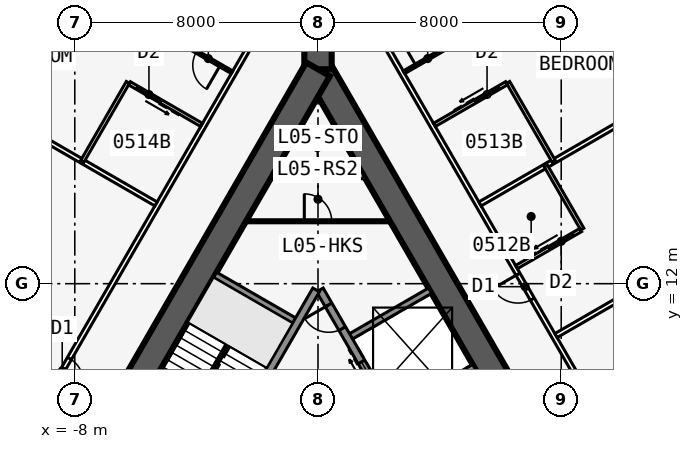
"""IFC4 building model, lengths in metres.
Left out: names, types, materials, properties, quantities, classifications, styles, units other than length and angle.
Written with IfcOpenShell. Run it as: python <this file> out.ifc"""

import sys

from ifc_helpers import new_model, si_unit, direction, frame, frame_2d, origin, place, context, subcontext, project, spatial, rectangle, extrude, element, fill, save


model = new_model("IFC4")
c1 = context("Model", 3, precision=1e-05, world=origin(), true_north=direction((0.0, 1.0)))
c2 = subcontext(c1, "Body", "Model", "MODEL_VIEW")
j1 = project(units=[si_unit("LENGTHUNIT", "METRE"), si_unit("PLANEANGLEUNIT", "RADIAN")], contexts=[c1])
p1 = place(None, origin())
s1 = spatial("IfcSite", under=j1, at=p1, CompositionType="ELEMENT")
p2 = place(p1, origin())
s2 = spatial("IfcBuilding", under=s1, at=p2, CompositionType="ELEMENT")
p3 = place(p2, frame((0.0, 0.0, 28.5)))
s3 = spatial("IfcBuildingStorey", under=s2, at=p3, CompositionType="ELEMENT", Elevation=28.5)
p4 = place(p3, frame((16.5, -9.526, 0.0), z_axis=(0.0, 0.0, 1.0), x_axis=(-0.499999749417, 0.866025548458, 0.0)))
e1 = element("IfcWall", 1, at=p4, inside=s3, PredefinedType="SHEAR", context=c2, shape_type="SweptSolid", body=[
    extrude(rectangle(XDim=33.0, YDim=0.9, at=frame_2d((16.5, 0.0))), origin(), (0.0, 0.0, 1.0), 3.4),
])
p5 = place(p4, frame((14.15, 0.0, 0.0)))
e2 = element("IfcOpeningElement", 2, at=p5, cuts=e1, PredefinedType="OPENING", context=c2, shape_type="SweptSolid", body=[
    extrude(rectangle(XDim=1.8, YDim=2.13, at=frame_2d((0.9, 1.065))), frame((0.0, 0.46, 0.0), z_axis=(0.0, -1.0, 0.0), x_axis=(1.0, 0.0, 0.0)), (0.0, 0.0, 1.0), 0.92),
])
p6 = place(p4, frame((12.6, 0.0, 0.0)))
e3 = element("IfcOpeningElement", 3, at=p6, cuts=e1, PredefinedType="OPENING", context=c2, shape_type="SweptSolid", body=[
    extrude(rectangle(XDim=1.0, YDim=2.13, at=frame_2d((0.5, 1.065))), frame((0.0, 0.46, 0.0), z_axis=(0.0, -1.0, 0.0), x_axis=(1.0, 0.0, 0.0)), (0.0, 0.0, 1.0), 0.92),
])
p7 = place(p3, frame((5.379, 2.586, 0.0), z_axis=(0.0, 0.0, 1.0), x_axis=(-0.500001375892, 0.866024609411, 0.0)))
e4 = element("IfcWall", 4, at=p7, inside=s3, PredefinedType="SOLIDWALL", context=c2, shape_type="SweptSolid", body=[
    extrude(rectangle(XDim=10.633, YDim=0.25, at=frame_2d((5.316, 0.0))), origin(), (0.0, 0.0, 1.0), 3.235),
])
p8 = place(p7, frame((9.164, 0.0, 0.0)))
e5 = element("IfcOpeningElement", 5, at=p8, cuts=e4, PredefinedType="OPENING", context=c2, shape_type="SweptSolid", body=[
    extrude(rectangle(XDim=0.9, YDim=2.13, at=frame_2d((0.45, 1.065))), frame((0.0, 0.135, 0.0), z_axis=(0.0, -1.0, 0.0), x_axis=(1.0, 0.0, 0.0)), (0.0, 0.0, 1.0), 0.27),
])
p9 = place(p7, frame((1.0, 0.0, 0.0)))
e6 = element("IfcOpeningElement", 6, at=p9, cuts=e4, PredefinedType="OPENING", context=c2, shape_type="SweptSolid", body=[
    extrude(rectangle(XDim=1.1, YDim=2.13, at=frame_2d((0.55, 1.065))), frame((0.0, 0.135, 0.0), z_axis=(0.0, -1.0, 0.0), x_axis=(1.0, 0.0, 0.0)), (0.0, 0.0, 1.0), 0.27),
])
p10 = place(p7, frame((3.9, 0.0, 0.0)))
e7 = element("IfcOpeningElement", 7, at=p10, cuts=e4, PredefinedType="OPENING", context=c2, shape_type="SweptSolid", body=[
    extrude(rectangle(XDim=1.1, YDim=2.13, at=frame_2d((0.55, 1.065))), frame((0.0, 0.135, 0.0), z_axis=(0.0, -1.0, 0.0), x_axis=(1.0, 0.0, 0.0)), (0.0, 0.0, 1.0), 0.27),
])
p11 = place(p7, frame((6.8, 0.0, 0.0)))
e8 = element("IfcOpeningElement", 8, at=p11, cuts=e4, PredefinedType="OPENING", context=c2, shape_type="SweptSolid", body=[
    extrude(rectangle(XDim=1.1, YDim=2.13, at=frame_2d((0.55, 1.065))), frame((0.0, 0.135, 0.0), z_axis=(0.0, -1.0, 0.0), x_axis=(1.0, 0.0, 0.0)), (0.0, 0.0, 1.0), 0.27),
])
for number, where, z_axis, x_axis in (
    (9, (2.429, 7.696, 0.0), (0.0, 0.0, 1.0), (0.866, 0.5, 0.0)),
    (10, (0.979, 10.207, 0.0), (0.0, 0.0, 1.0), (0.866, 0.5, 0.0)),
):
    element("IfcWall", number, at=place(p3, frame(where, z_axis=z_axis, x_axis=x_axis)), inside=s3, PredefinedType="SOLIDWALL", context=c2, shape_type="SweptSolid", body=[
        extrude(rectangle(XDim=3.125, YDim=0.2, at=frame_2d((1.562, 0.0))), origin(), (0.0, 0.0, 1.0), 3.235),
    ])
p12 = place(p3, frame((0.0, 19.052, 0.0), z_axis=(0.0, 0.0, 1.0), x_axis=(-0.499999749417, -0.866025548458, 0.0)))
e11 = element("IfcWall", 11, at=p12, inside=s3, PredefinedType="SHEAR", context=c2, shape_type="SweptSolid", body=[
    extrude(rectangle(XDim=33.0, YDim=0.9, at=frame_2d((16.5, 0.0))), origin(), (0.0, 0.0, 1.0), 3.4),
])
p13 = place(p12, frame((14.15, 0.0, 0.0)))
e12 = element("IfcOpeningElement", 12, at=p13, cuts=e11, PredefinedType="OPENING", context=c2, shape_type="SweptSolid", body=[
    extrude(rectangle(XDim=1.8, YDim=2.13, at=frame_2d((0.9, 1.065))), frame((0.0, 0.46, 0.0), z_axis=(0.0, -1.0, 0.0), x_axis=(1.0, 0.0, 0.0)), (0.0, 0.0, 1.0), 0.92),
])
p14 = place(p12, frame((12.6, 0.0, 0.0)))
e13 = element("IfcOpeningElement", 13, at=p14, cuts=e11, PredefinedType="OPENING", context=c2, shape_type="SweptSolid", body=[
    extrude(rectangle(XDim=1.0, YDim=2.13, at=frame_2d((0.5, 1.065))), frame((0.0, 0.46, 0.0), z_axis=(0.0, -1.0, 0.0), x_axis=(1.0, 0.0, 0.0)), (0.0, 0.0, 1.0), 0.92),
])
p15 = place(p3, frame((-0.062, 11.794, 0.0), z_axis=(0.0, 0.0, 1.0), x_axis=(-0.500006680225, -0.86602154692, 0.0)))
e14 = element("IfcWall", 14, at=p15, inside=s3, PredefinedType="SOLIDWALL", context=c2, shape_type="SweptSolid", body=[
    extrude(rectangle(XDim=7.733, YDim=0.25, at=frame_2d((3.866, 0.0))), origin(), (0.0, 0.0, 1.0), 3.235),
])
p16 = place(p3, frame((-0.679, 10.727, 0.0), z_axis=(0.0, 0.0, 1.0), x_axis=(-0.866022959057, 0.500004234368, 0.0)))
e15 = element("IfcWall", 15, at=p16, inside=s3, PredefinedType="SOLIDWALL", context=c2, shape_type="SweptSolid", body=[
    extrude(rectangle(XDim=3.125, YDim=0.2, at=frame_2d((1.562, 0.0))), origin(), (0.0, 0.0, 1.0), 3.235),
])
p17 = place(p3, frame((0.0, 19.052, 0.0), z_axis=(0.0, 0.0, 1.0), x_axis=(0.0, 1.0, 0.0)))
e16 = element("IfcWall", 16, at=p17, inside=s3, PredefinedType="SHEAR", context=c2, shape_type="SweptSolid", body=[
    extrude(rectangle(XDim=4.746, YDim=0.9, at=frame_2d((2.373, 0.0))), origin(), (0.0, 0.0, 1.0), 3.4),
])
p18 = place(p17, frame((1.8, 0.0, 0.0)))
e17 = element("IfcOpeningElement", 17, at=p18, cuts=e16, PredefinedType="OPENING", context=c2, shape_type="SweptSolid", body=[
    extrude(rectangle(XDim=1.8, YDim=2.13, at=frame_2d((0.9, 1.065))), frame((0.0, 0.46, 0.0), z_axis=(0.0, -1.0, 0.0), x_axis=(1.0, 0.0, 0.0)), (0.0, 0.0, 1.0), 0.92),
])
p19 = place(p3, frame((20.027, -10.985, 0.0), z_axis=(0.0, 0.0, 1.0), x_axis=(-0.500001677587, 0.866024435227, 0.0)))
e18 = element("IfcWall", 18, at=p19, inside=s3, PredefinedType="PARTITIONING", context=c2, shape_type="SweptSolid", body=[
    extrude(rectangle(XDim=39.054, YDim=0.15, at=frame_2d((19.527, 0.0))), origin(), (0.0, 0.0, 1.0), 3.235),
])
p20 = place(p19, frame((0.352, 0.0, 0.0)))
e19 = element("IfcOpeningElement", 19, at=p20, cuts=e18, PredefinedType="OPENING", context=c2, shape_type="SweptSolid", body=[
    extrude(rectangle(XDim=0.95, YDim=2.13, at=frame_2d((0.475, 1.065))), frame((0.0, 0.085, 0.0), z_axis=(0.0, -1.0, 0.0), x_axis=(1.0, 0.0, 0.0)), (0.0, 0.0, 1.0), 0.17),
])
p21 = place(p19, frame((5.952, 0.0, 0.0)))
e20 = element("IfcOpeningElement", 20, at=p21, cuts=e18, PredefinedType="OPENING", context=c2, shape_type="SweptSolid", body=[
    extrude(rectangle(XDim=0.95, YDim=2.13, at=frame_2d((0.475, 1.065))), frame((0.0, 0.085, 0.0), z_axis=(0.0, -1.0, 0.0), x_axis=(1.0, 0.0, 0.0)), (0.0, 0.0, 1.0), 0.17),
])
p22 = place(p19, frame((12.152, 0.0, 0.0)))
e21 = element("IfcOpeningElement", 21, at=p22, cuts=e18, PredefinedType="OPENING", context=c2, shape_type="SweptSolid", body=[
    extrude(rectangle(XDim=0.95, YDim=2.13, at=frame_2d((0.475, 1.065))), frame((0.0, 0.085, 0.0), z_axis=(0.0, -1.0, 0.0), x_axis=(1.0, 0.0, 0.0)), (0.0, 0.0, 1.0), 0.17),
])
p23 = place(p19, frame((15.952, 0.0, 0.0)))
e22 = element("IfcOpeningElement", 22, at=p23, cuts=e18, PredefinedType="OPENING", context=c2, shape_type="SweptSolid", body=[
    extrude(rectangle(XDim=0.95, YDim=2.13, at=frame_2d((0.475, 1.065))), frame((0.0, 0.085, 0.0), z_axis=(0.0, -1.0, 0.0), x_axis=(1.0, 0.0, 0.0)), (0.0, 0.0, 1.0), 0.17),
])
p24 = place(p19, frame((22.152, 0.0, 0.0)))
e23 = element("IfcOpeningElement", 23, at=p24, cuts=e18, PredefinedType="OPENING", context=c2, shape_type="SweptSolid", body=[
    extrude(rectangle(XDim=0.95, YDim=2.13, at=frame_2d((0.475, 1.065))), frame((0.0, 0.085, 0.0), z_axis=(0.0, -1.0, 0.0), x_axis=(1.0, 0.0, 0.0)), (0.0, 0.0, 1.0), 0.17),
])
p25 = place(p19, frame((25.952, 0.0, 0.0)))
e24 = element("IfcOpeningElement", 24, at=p25, cuts=e18, PredefinedType="OPENING", context=c2, shape_type="SweptSolid", body=[
    extrude(rectangle(XDim=0.95, YDim=2.13, at=frame_2d((0.475, 1.065))), frame((0.0, 0.085, 0.0), z_axis=(0.0, -1.0, 0.0), x_axis=(1.0, 0.0, 0.0)), (0.0, 0.0, 1.0), 0.17),
])
p26 = place(p19, frame((36.546, 0.0, 0.0)))
e25 = element("IfcOpeningElement", 25, at=p26, cuts=e18, PredefinedType="OPENING", context=c2, shape_type="SweptSolid", body=[
    extrude(rectangle(XDim=0.95, YDim=2.13, at=frame_2d((0.475, 1.065))), frame((0.0, 0.085, 0.0), z_axis=(0.0, -1.0, 0.0), x_axis=(1.0, 0.0, 0.0)), (0.0, 0.0, 1.0), 0.17),
])
p27 = place(p3, frame((7.829, 10.293, 0.0), z_axis=(0.0, 0.0, 1.0), x_axis=(0.866016302457, 0.50001576363, 0.0)))
e26 = element("IfcWall", 26, at=p27, inside=s3, PredefinedType="PARTITIONING", context=c2, shape_type="SweptSolid", body=[
    extrude(rectangle(XDim=9.943, YDim=0.15, at=frame_2d((4.972, 0.0))), origin(), (0.0, 0.0, 1.0), 2.389),
])
p28 = place(p3, frame((5.329, 14.623, 0.0), z_axis=(0.0, 0.0, 1.0), x_axis=(0.866018409083, 0.500012114982, 0.0)))
e27 = element("IfcWall", 27, at=p28, inside=s3, PredefinedType="PARTITIONING", context=c2, shape_type="SweptSolid", body=[
    extrude(rectangle(XDim=9.485, YDim=0.15, at=frame_2d((4.742, 0.0))), origin(), (0.0, 0.0, 1.0), 2.389),
])
p29 = place(p3, frame((2.829, 18.954, 0.0), z_axis=(0.0, 0.0, 1.0), x_axis=(0.866020536561, 0.500008430184, 0.0)))
e28 = element("IfcWall", 28, at=p29, inside=s3, PredefinedType="PARTITIONING", context=c2, shape_type="SweptSolid", body=[
    extrude(rectangle(XDim=8.72, YDim=0.1, at=frame_2d((4.36, 0.0))), origin(), (0.0, 0.0, 1.0), 2.389),
])
p30 = place(p29, frame((0.45, 0.0, 0.0)))
e29 = element("IfcOpeningElement", 29, at=p30, cuts=e28, PredefinedType="OPENING", context=c2, shape_type="SweptSolid", body=[
    extrude(rectangle(XDim=0.9, YDim=2.13, at=frame_2d((0.45, 1.065))), frame((0.0, 0.06, 0.0), z_axis=(0.0, -1.0, 0.0), x_axis=(1.0, 0.0, 0.0)), (0.0, 0.0, 1.0), 0.12),
])
p31 = place(p3, frame((9.128, 8.042, 0.0), z_axis=(0.0, 0.0, 1.0), x_axis=(0.866005645448, 0.500034220881, 0.0)))
e30 = element("IfcWall", 30, at=p31, inside=s3, PredefinedType="PLUMBINGWALL", context=c2, shape_type="SweptSolid", body=[
    extrude(rectangle(XDim=2.44, YDim=0.12, at=frame_2d((1.22, 0.0))), origin(), (0.0, 0.0, 1.0), 3.235),
])
p32 = place(p31, frame((1.25, 0.0, 0.0)))
e31 = element("IfcOpeningElement", 31, at=p32, cuts=e30, PredefinedType="OPENING", context=c2, shape_type="SweptSolid", body=[
    extrude(rectangle(XDim=0.9, YDim=2.13, at=frame_2d((0.45, 1.065))), frame((0.0, 0.07, 0.0), z_axis=(0.0, -1.0, 0.0), x_axis=(1.0, 0.0, 0.0)), (0.0, 0.0, 1.0), 0.14),
])
p33 = place(p3, frame((8.694, 13.795, 0.0), z_axis=(0.0, 0.0, 1.0), x_axis=(-0.500077600433, 0.865980596518, 0.0)))
e32 = element("IfcWall", 32, at=p33, inside=s3, PredefinedType="PLUMBINGWALL", context=c2, shape_type="SweptSolid", body=[
    extrude(rectangle(XDim=2.4, YDim=0.12, at=frame_2d((1.2, 0.0))), origin(), (0.0, 0.0, 1.0), 3.235),
])
p34 = place(p3, frame((6.529, 12.545, 0.0), z_axis=(0.0, 0.0, 1.0), x_axis=(0.866023955769, 0.500002508028, 0.0)))
e33 = element("IfcWall", 33, at=p34, inside=s3, PredefinedType="PLUMBINGWALL", context=c2, shape_type="SweptSolid", body=[
    extrude(rectangle(XDim=2.44, YDim=0.12, at=frame_2d((1.22, 0.0))), origin(), (0.0, 0.0, 1.0), 3.235),
])
p35 = place(p34, frame((1.25, 0.0, 0.0)))
e34 = element("IfcOpeningElement", 34, at=p35, cuts=e33, PredefinedType="OPENING", context=c2, shape_type="SweptSolid", body=[
    extrude(rectangle(XDim=0.9, YDim=2.13, at=frame_2d((0.45, 1.065))), frame((0.0, 0.07, 0.0), z_axis=(0.0, -1.0, 0.0), x_axis=(1.0, 0.0, 0.0)), (0.0, 0.0, 1.0), 0.14),
])
p36 = place(p3, frame((7.753, 16.023, 0.0), z_axis=(0.0, 0.0, 1.0), x_axis=(-0.499990139034, 0.866031096941, 0.0)))
e35 = element("IfcWall", 35, at=p36, inside=s3, PredefinedType="PLUMBINGWALL", context=c2, shape_type="SweptSolid", body=[
    extrude(rectangle(XDim=3.0, YDim=0.12, at=frame_2d((1.5, 0.0))), origin(), (0.0, 0.0, 1.0), 3.235),
])
p37 = place(p3, frame((3.829, 17.221, 0.0), z_axis=(0.0, 0.0, 1.0), x_axis=(0.865997131366, 0.500048966069, 0.0)))
e36 = element("IfcWall", 36, at=p37, inside=s3, PredefinedType="PLUMBINGWALL", context=c2, shape_type="SweptSolid", body=[
    extrude(rectangle(XDim=2.74, YDim=0.12, at=frame_2d((1.37, 0.0))), origin(), (0.0, 0.0, 1.0), 3.235),
])
p38 = place(p37, frame((1.55, 0.0, 0.0)))
e37 = element("IfcOpeningElement", 37, at=p38, cuts=e36, PredefinedType="OPENING", context=c2, shape_type="SweptSolid", body=[
    extrude(rectangle(XDim=0.9, YDim=2.13, at=frame_2d((0.45, 1.065))), frame((0.0, 0.07, 0.0), z_axis=(0.0, -1.0, 0.0), x_axis=(1.0, 0.0, 0.0)), (0.0, 0.0, 1.0), 0.14),
])
p39 = place(p3, frame((-0.5, 22.836, 0.0), z_axis=(0.0, 0.0, 1.0), x_axis=(-0.500001677587, -0.866024435227, 0.0)))
e38 = element("IfcWall", 38, at=p39, inside=s3, PredefinedType="PARTITIONING", context=c2, shape_type="SweptSolid", body=[
    extrude(rectangle(XDim=39.054, YDim=0.15, at=frame_2d((19.527, 0.0))), origin(), (0.0, 0.0, 1.0), 3.235),
])
p40 = place(p39, frame((1.558, 0.0, 0.0)))
e39 = element("IfcOpeningElement", 39, at=p40, cuts=e38, PredefinedType="OPENING", context=c2, shape_type="SweptSolid", body=[
    extrude(rectangle(XDim=0.95, YDim=2.13, at=frame_2d((0.475, 1.065))), frame((0.0, 0.085, 0.0), z_axis=(0.0, -1.0, 0.0), x_axis=(1.0, 0.0, 0.0)), (0.0, 0.0, 1.0), 0.17),
])
p41 = place(p39, frame((15.352, 0.0, 0.0)))
e40 = element("IfcOpeningElement", 40, at=p41, cuts=e38, PredefinedType="OPENING", context=c2, shape_type="SweptSolid", body=[
    extrude(rectangle(XDim=0.95, YDim=2.13, at=frame_2d((0.475, 1.065))), frame((0.0, 0.085, 0.0), z_axis=(0.0, -1.0, 0.0), x_axis=(1.0, 0.0, 0.0)), (0.0, 0.0, 1.0), 0.17),
])
p42 = place(p39, frame((22.752, 0.0, 0.0)))
e41 = element("IfcOpeningElement", 41, at=p42, cuts=e38, PredefinedType="OPENING", context=c2, shape_type="SweptSolid", body=[
    extrude(rectangle(XDim=0.95, YDim=2.13, at=frame_2d((0.475, 1.065))), frame((0.0, 0.085, 0.0), z_axis=(0.0, -1.0, 0.0), x_axis=(1.0, 0.0, 0.0)), (0.0, 0.0, 1.0), 0.17),
])
p43 = place(p39, frame((30.952, 0.0, 0.0)))
e42 = element("IfcOpeningElement", 42, at=p43, cuts=e38, PredefinedType="OPENING", context=c2, shape_type="SweptSolid", body=[
    extrude(rectangle(XDim=0.95, YDim=2.13, at=frame_2d((0.475, 1.065))), frame((0.0, 0.085, 0.0), z_axis=(0.0, -1.0, 0.0), x_axis=(1.0, 0.0, 0.0)), (0.0, 0.0, 1.0), 0.17),
])
p44 = place(p39, frame((37.752, 0.0, 0.0)))
e43 = element("IfcOpeningElement", 43, at=p44, cuts=e38, PredefinedType="OPENING", context=c2, shape_type="SweptSolid", body=[
    extrude(rectangle(XDim=0.95, YDim=2.13, at=frame_2d((0.475, 1.065))), frame((0.0, 0.085, 0.0), z_axis=(0.0, -1.0, 0.0), x_axis=(1.0, 0.0, 0.0)), (0.0, 0.0, 1.0), 0.17),
])
p45 = place(p3, frame((-2.829, 18.954, 0.0), z_axis=(0.0, 0.0, 1.0), x_axis=(-0.866020536561, 0.500008430184, 0.0)))
e44 = element("IfcWall", 44, at=p45, inside=s3, PredefinedType="PARTITIONING", context=c2, shape_type="SweptSolid", body=[
    extrude(rectangle(XDim=8.72, YDim=0.1, at=frame_2d((4.36, 0.0))), origin(), (0.0, 0.0, 1.0), 2.389),
])
p46 = place(p45, frame((0.45, 0.0, 0.0)))
e45 = element("IfcOpeningElement", 45, at=p46, cuts=e44, PredefinedType="OPENING", context=c2, shape_type="SweptSolid", body=[
    extrude(rectangle(XDim=0.9, YDim=2.13, at=frame_2d((0.45, 1.065))), frame((0.0, 0.06, 0.0), z_axis=(0.0, -1.0, 0.0), x_axis=(1.0, 0.0, 0.0)), (0.0, 0.0, 1.0), 0.12),
])
p47 = place(p3, frame((-5.329, 14.623, 0.0), z_axis=(0.0, 0.0, 1.0), x_axis=(-0.866018409083, 0.500012114982, 0.0)))
e46 = element("IfcWall", 46, at=p47, inside=s3, PredefinedType="PARTITIONING", context=c2, shape_type="SweptSolid", body=[
    extrude(rectangle(XDim=9.485, YDim=0.15, at=frame_2d((4.742, 0.0))), origin(), (0.0, 0.0, 1.0), 2.389),
])
p48 = place(p3, frame((-6.253, 18.622, 0.0), z_axis=(0.0, 0.0, 1.0), x_axis=(-0.499990139034, -0.866031096941, 0.0)))
e47 = element("IfcWall", 47, at=p48, inside=s3, PredefinedType="PLUMBINGWALL", context=c2, shape_type="SweptSolid", body=[
    extrude(rectangle(XDim=3.0, YDim=0.12, at=frame_2d((1.5, 0.0))), origin(), (0.0, 0.0, 1.0), 3.235),
])
p49 = place(p3, frame((-3.829, 17.221, 0.0), z_axis=(0.0, 0.0, 1.0), x_axis=(-0.865997131366, 0.500048966069, 0.0)))
e48 = element("IfcWall", 48, at=p49, inside=s3, PredefinedType="PLUMBINGWALL", context=c2, shape_type="SweptSolid", body=[
    extrude(rectangle(XDim=2.74, YDim=0.12, at=frame_2d((1.37, 0.0))), origin(), (0.0, 0.0, 1.0), 3.235),
])
p50 = place(p49, frame((1.55, 0.0, 0.0)))
e49 = element("IfcOpeningElement", 49, at=p50, cuts=e48, PredefinedType="OPENING", context=c2, shape_type="SweptSolid", body=[
    extrude(rectangle(XDim=0.9, YDim=2.13, at=frame_2d((0.45, 1.065))), frame((0.0, 0.07, 0.0), z_axis=(0.0, -1.0, 0.0), x_axis=(1.0, 0.0, 0.0)), (0.0, 0.0, 1.0), 0.14),
])
p51 = place(p3, frame((-1.501, 15.552, 0.0), z_axis=(0.0, 0.0, 1.0), x_axis=(1.0, 0.0, 0.0)))
e50 = element("IfcWall", 50, at=p51, inside=s3, PredefinedType="SOLIDWALL", context=c2, shape_type="SweptSolid", body=[
    extrude(rectangle(XDim=3.002, YDim=0.2, at=frame_2d((1.501, 0.0))), origin(), (0.0, 0.0, 1.0), 3.235),
])
p52 = place(p3, frame((-2.367, 14.052, 0.0), z_axis=(0.0, 0.0, 1.0), x_axis=(1.0, 0.0, 0.0)))
e51 = element("IfcWall", 51, at=p52, inside=s3, PredefinedType="PARTITIONING", context=c2, shape_type="SweptSolid", body=[
    extrude(rectangle(XDim=4.734, YDim=0.1, at=frame_2d((2.367, 0.0))), origin(), (0.0, 0.0, 1.0), 3.235),
])
p53 = place(p52, frame((1.917, 0.0, 0.0)))
e52 = element("IfcOpeningElement", 52, at=p53, cuts=e51, PredefinedType="OPENING", context=c2, shape_type="SweptSolid", body=[
    extrude(rectangle(XDim=0.9, YDim=2.13, at=frame_2d((0.45, 1.065))), frame((0.0, 0.06, 0.0), z_axis=(0.0, -1.0, 0.0), x_axis=(1.0, 0.0, 0.0)), (0.0, 0.0, 1.0), 0.12),
])
p54 = place(p3, frame((-2.988, 9.978, 0.0), z_axis=(0.0, 0.0, 1.0), x_axis=(-0.499992232847, -0.866029888106, 0.0)))
e53 = element("IfcWall", 53, at=p54, inside=s3, PredefinedType="SOLIDWALL", context=c2, shape_type="SweptSolid", body=[
    extrude(rectangle(XDim=2.794, YDim=0.1, at=frame_2d((1.397, 0.0))), origin(), (0.0, 0.0, 1.0), 3.4),
])
p55 = place(p30, origin())
e54 = element("IfcDoor", 54, at=p55, inside=s3, OperationType="SINGLE_SWING_LEFT", PredefinedType="DOOR", context=c2, shape_type="SweptSolid", body=[
    extrude(rectangle(XDim=0.9, YDim=2.13, at=frame_2d((0.45, 1.065))), frame((0.0, 0.025, 0.0), z_axis=(0.0, -1.0, 0.0), x_axis=(1.0, 0.0, 0.0)), (0.0, 0.0, 1.0), 0.05),
])
fill(e29, e54)
p56 = place(p35, origin())
e55 = element("IfcDoor", 55, at=p56, inside=s3, OperationType="SLIDING_TO_LEFT", PredefinedType="DOOR", context=c2, shape_type="SweptSolid", body=[
    extrude(rectangle(XDim=0.9, YDim=2.13, at=frame_2d((0.45, 1.065))), frame((0.0, 0.025, 0.0), z_axis=(0.0, -1.0, 0.0), x_axis=(1.0, 0.0, 0.0)), (0.0, 0.0, 1.0), 0.05),
])
fill(e34, e55)
p57 = place(p25, origin())
e56 = element("IfcDoor", 56, at=p57, inside=s3, OperationType="SINGLE_SWING_RIGHT", PredefinedType="DOOR", context=c2, shape_type="SweptSolid", body=[
    extrude(rectangle(XDim=0.95, YDim=2.13, at=frame_2d((0.475, 1.065))), frame((0.0, 0.025, 0.0), z_axis=(0.0, -1.0, 0.0), x_axis=(1.0, 0.0, 0.0)), (0.0, 0.0, 1.0), 0.05),
])
fill(e24, e56)
p58 = place(p38, origin())
e57 = element("IfcDoor", 57, at=p58, inside=s3, OperationType="SLIDING_TO_LEFT", PredefinedType="DOOR", context=c2, shape_type="SweptSolid", body=[
    extrude(rectangle(XDim=0.9, YDim=2.13, at=frame_2d((0.45, 1.065))), frame((0.0, 0.025, 0.0), z_axis=(0.0, -1.0, 0.0), x_axis=(1.0, 0.0, 0.0)), (0.0, 0.0, 1.0), 0.05),
])
fill(e37, e57)
p59 = place(p46, origin())
e58 = element("IfcDoor", 58, at=p59, inside=s3, OperationType="SINGLE_SWING_LEFT", PredefinedType="DOOR", context=c2, shape_type="SweptSolid", body=[
    extrude(rectangle(XDim=0.9, YDim=2.13, at=frame_2d((0.45, 1.065))), frame((0.0, 0.025, 0.0), z_axis=(0.0, -1.0, 0.0), x_axis=(1.0, 0.0, 0.0)), (0.0, 0.0, 1.0), 0.05),
])
fill(e45, e58)
p60 = place(p50, origin())
e59 = element("IfcDoor", 59, at=p60, inside=s3, OperationType="SLIDING_TO_LEFT", PredefinedType="DOOR", context=c2, shape_type="SweptSolid", body=[
    extrude(rectangle(XDim=0.9, YDim=2.13, at=frame_2d((0.45, 1.065))), frame((0.0, 0.025, 0.0), z_axis=(0.0, -1.0, 0.0), x_axis=(1.0, 0.0, 0.0)), (0.0, 0.0, 1.0), 0.05),
])
fill(e49, e59)
p61 = place(p41, origin())
e60 = element("IfcDoor", 60, at=p61, inside=s3, OperationType="SINGLE_SWING_RIGHT", PredefinedType="DOOR", context=c2, shape_type="SweptSolid", body=[
    extrude(rectangle(XDim=0.95, YDim=2.13, at=frame_2d((0.475, 1.065))), frame((0.0, 0.025, 0.0), z_axis=(0.0, -1.0, 0.0), x_axis=(1.0, 0.0, 0.0)), (0.0, 0.0, 1.0), 0.05),
])
fill(e40, e60)
p62 = place(p53, origin())
e61 = element("IfcDoor", 61, at=p62, inside=s3, OperationType="SINGLE_SWING_LEFT", PredefinedType="DOOR", context=c2, shape_type="SweptSolid", body=[
    extrude(rectangle(XDim=0.9, YDim=2.13, at=frame_2d((0.45, 1.065))), frame((0.0, 0.025, 0.0), z_axis=(0.0, -1.0, 0.0), x_axis=(1.0, 0.0, 0.0)), (0.0, 0.0, 1.0), 0.05),
])
fill(e52, e61)
p63 = place(p8, origin())
e62 = element("IfcDoor", 62, at=p63, inside=s3, OperationType="SINGLE_SWING_RIGHT", PredefinedType="DOOR", context=c2, shape_type="SweptSolid", body=[
    extrude(rectangle(XDim=0.9, YDim=2.13, at=frame_2d((0.45, 1.065))), frame((0.0, 0.025, 0.0), z_axis=(0.0, -1.0, 0.0), x_axis=(1.0, 0.0, 0.0)), (0.0, 0.0, 1.0), 0.05),
])
fill(e5, e62)
p64 = place(p11, origin())
e63 = element("IfcDoor", 63, at=p64, inside=s3, OperationType="DOUBLE_DOOR_SLIDING", PredefinedType="USERDEFINED", context=c2, shape_type="SweptSolid", body=[
    extrude(rectangle(XDim=1.1, YDim=2.13, at=frame_2d((0.55, 1.065))), frame((0.0, 0.025, 0.0), z_axis=(0.0, -1.0, 0.0), x_axis=(1.0, 0.0, 0.0)), (0.0, 0.0, 1.0), 0.05),
])
fill(e8, e63)
save(model, sys.argv[1])
